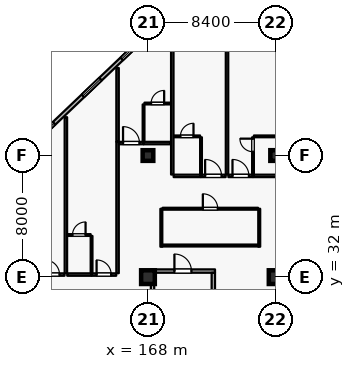
"""IFC4 building model, lengths in metres.
Left out: names, types, materials, properties, quantities, classifications, styles, units other than length and angle.
Written with IfcOpenShell. Run it as: python <this file> out.ifc"""

import sys

from ifc_helpers import new_model, si_unit, direction, frame, frame_2d, origin, origin_2d, place, context, subcontext, project, spatial, rectangle, extrude, element, fill, save


model = new_model("IFC4")
c1 = context("Model", 3, precision=1e-05, world=origin(), true_north=direction((0.0, 1.0)))
c2 = subcontext(c1, "Body", "Model", "MODEL_VIEW")
j1 = project(units=[si_unit("LENGTHUNIT", "METRE"), si_unit("PLANEANGLEUNIT", "RADIAN")], contexts=[c1])
p1 = place(None, origin())
s1 = spatial("IfcSite", under=j1, at=p1, CompositionType="ELEMENT")
p2 = place(p1, origin())
s2 = spatial("IfcBuilding", under=s1, at=p2, CompositionType="ELEMENT")
p3 = place(p2, frame((0.0, 0.0, 25.2)))
s3 = spatial("IfcBuildingStorey", under=s2, at=p3, CompositionType="ELEMENT", Elevation=25.2)
for number, where, z_axis, x_axis in (
    (1, (168.0, 32.0, 0.0), (0.0, 0.0, 1.0), (1.0, 0.0, 0.0)),
    (2, (176.4, 32.0, 0.0), (0.0, 0.0, 1.0), (1.0, 0.0, 0.0)),
):
    element("IfcColumn", number, at=place(p3, frame(where, z_axis=z_axis, x_axis=x_axis)), inside=s3, PredefinedType="COLUMN", context=c2, shape_type="SweptSolid", body=[
        extrude(rectangle(XDim=0.9, YDim=0.9, at=origin_2d()), origin(), (0.0, 0.0, 1.0), 3.6),
    ])
for number, where, z_axis, x_axis in (
    (3, (168.0, 40.0, 0.0), (0.0, 0.0, 1.0), (1.0, 0.0, 0.0)),
    (4, (176.4, 40.0, 0.0), (0.0, 0.0, 1.0), (1.0, 0.0, 0.0)),
):
    element("IfcColumn", number, at=place(p3, frame(where, z_axis=z_axis, x_axis=x_axis)), inside=s3, PredefinedType="COLUMN", context=c2, shape_type="SweptSolid", body=[
        extrude(rectangle(XDim=0.7, YDim=0.7, at=origin_2d()), origin(), (0.0, 0.0, 1.0), 3.6),
    ])
p4 = place(p3, frame((160.0, 40.381, 0.0), z_axis=(0.0, 0.0, 1.0), x_axis=(0.724156739794, 0.689635422677, 0.0)))
e5 = element("IfcWall", 5, at=p4, inside=s3, PredefinedType="SOLIDWALL", context=c2, shape_type="SweptSolid", body=[
    extrude(rectangle(XDim=10.495, YDim=0.24, at=frame_2d((5.248, 0.0))), origin(), (0.0, 0.0, 1.0), 2.93),
])
p5 = place(p4, frame((0.926, 0.0, 0.8)))
e6 = element("IfcOpeningElement", 6, at=p5, cuts=e5, PredefinedType="OPENING", context=c2, shape_type="SweptSolid", body=[
    extrude(rectangle(XDim=1.6, YDim=1.6, at=frame_2d((0.8, 0.8))), frame((0.0, 0.13, 0.0), z_axis=(0.0, -1.0, 0.0), x_axis=(1.0, 0.0, 0.0)), (0.0, 0.0, 1.0), 0.26),
])
p6 = place(p4, frame((5.138, 0.0, 0.8)))
e7 = element("IfcOpeningElement", 7, at=p6, cuts=e5, PredefinedType="OPENING", context=c2, shape_type="SweptSolid", body=[
    extrude(rectangle(XDim=1.6, YDim=1.6, at=frame_2d((0.8, 0.8))), frame((0.0, 0.13, 0.0), z_axis=(0.0, -1.0, 0.0), x_axis=(1.0, 0.0, 0.0)), (0.0, 0.0, 1.0), 0.26),
])
p7 = place(p4, frame((8.659, 0.0, 0.8)))
e8 = element("IfcOpeningElement", 8, at=p7, cuts=e5, PredefinedType="OPENING", context=c2, shape_type="SweptSolid", body=[
    extrude(rectangle(XDim=1.6, YDim=1.6, at=frame_2d((0.8, 0.8))), frame((0.0, 0.13, 0.0), z_axis=(0.0, -1.0, 0.0), x_axis=(1.0, 0.0, 0.0)), (0.0, 0.0, 1.0), 0.26),
])
p8 = place(p3, frame((168.3, 29.365, 0.0), z_axis=(0.0, 0.0, 1.0), x_axis=(0.0, 1.0, 0.0)))
e9 = element("IfcWall", 9, at=p8, inside=s3, PredefinedType="PARTITIONING", context=c2, shape_type="SweptSolid", body=[
    extrude(rectangle(XDim=2.92, YDim=0.22, at=frame_2d((1.46, 0.0))), origin(), (0.0, 0.0, 1.0), 3.335),
])
p9 = place(p3, frame((168.19, 32.4, 0.0), z_axis=(0.0, 0.0, 1.0), x_axis=(1.0, 0.0, 0.0)))
e10 = element("IfcWall", 10, at=p9, inside=s3, PredefinedType="PARTITIONING", context=c2, shape_type="SweptSolid", body=[
    extrude(rectangle(XDim=4.22, YDim=0.22, at=frame_2d((2.11, 0.0))), origin(), (0.0, 0.0, 1.0), 3.335),
])
p10 = place(p9, frame((1.55, 0.0, 0.0)))
e11 = element("IfcOpeningElement", 11, at=p10, cuts=e10, PredefinedType="OPENING", context=c2, shape_type="SweptSolid", body=[
    extrude(rectangle(XDim=1.12, YDim=2.2, at=frame_2d((0.56, 1.1))), frame((0.0, 0.12, 0.0), z_axis=(0.0, -1.0, 0.0), x_axis=(1.0, 0.0, 0.0)), (0.0, 0.0, 1.0), 0.24),
])
p11 = place(p3, frame((172.3, 29.365, 0.0), z_axis=(0.0, 0.0, 1.0), x_axis=(0.0, 1.0, 0.0)))
e12 = element("IfcWall", 12, at=p11, inside=s3, PredefinedType="PARTITIONING", context=c2, shape_type="SweptSolid", body=[
    extrude(rectangle(XDim=2.92, YDim=0.22, at=frame_2d((1.46, 0.0))), origin(), (0.0, 0.0, 1.0), 3.335),
])
p12 = place(p3, frame((160.89, 32.17, 0.0), z_axis=(0.0, 0.0, 1.0), x_axis=(1.0, 0.0, 0.0)))
e13 = element("IfcWall", 13, at=p12, inside=s3, PredefinedType="PARTITIONING", context=c2, shape_type="SweptSolid", body=[
    extrude(rectangle(XDim=1.62, YDim=0.16, at=frame_2d((0.81, 0.0))), origin(), (0.0, 0.0, 1.0), 3.335),
])
p13 = place(p12, frame((0.33, 0.0, 0.0)))
e14 = element("IfcOpeningElement", 14, at=p13, cuts=e13, PredefinedType="OPENING", context=c2, shape_type="SweptSolid", body=[
    extrude(rectangle(XDim=0.96, YDim=2.2, at=frame_2d((0.48, 1.1))), frame((0.0, 0.09, 0.0), z_axis=(0.0, -1.0, 0.0), x_axis=(1.0, 0.0, 0.0)), (0.0, 0.0, 1.0), 0.18),
])
p14 = place(p3, frame((162.69, 32.17, 0.0), z_axis=(0.0, 0.0, 1.0), x_axis=(1.0, 0.0, 0.0)))
e15 = element("IfcWall", 15, at=p14, inside=s3, PredefinedType="PARTITIONING", context=c2, shape_type="SweptSolid", body=[
    extrude(rectangle(XDim=1.59, YDim=0.16, at=frame_2d((0.795, 0.0))), origin(), (0.0, 0.0, 1.0), 3.335),
])
p15 = place(p3, frame((164.29, 32.17, 0.0), z_axis=(0.0, 0.0, 1.0), x_axis=(1.0, 0.0, 0.0)))
e16 = element("IfcWall", 16, at=p15, inside=s3, PredefinedType="PARTITIONING", context=c2, shape_type="SweptSolid", body=[
    extrude(rectangle(XDim=1.62, YDim=0.16, at=frame_2d((0.81, 0.0))), origin(), (0.0, 0.0, 1.0), 3.335),
])
p16 = place(p15, frame((0.33, 0.0, 0.0)))
e17 = element("IfcOpeningElement", 17, at=p16, cuts=e16, PredefinedType="OPENING", context=c2, shape_type="SweptSolid", body=[
    extrude(rectangle(XDim=0.96, YDim=2.2, at=frame_2d((0.48, 1.1))), frame((0.0, 0.09, 0.0), z_axis=(0.0, -1.0, 0.0), x_axis=(1.0, 0.0, 0.0)), (0.0, 0.0, 1.0), 0.18),
])
p17 = place(p3, frame((164.29, 32.26, 0.0), z_axis=(0.0, 0.0, 1.0), x_axis=(0.0, 1.0, 0.0)))
e18 = element("IfcWall", 18, at=p17, inside=s3, PredefinedType="PARTITIONING", context=c2, shape_type="SweptSolid", body=[
    extrude(rectangle(XDim=2.45, YDim=0.115, at=frame_2d((1.225, 0.0))), origin(), (0.0, 0.0, 1.0), 3.335),
])
p18 = place(p3, frame((162.7, 34.77, 0.0), z_axis=(0.0, 0.0, 1.0), x_axis=(1.0, 0.0, 0.0)))
e19 = element("IfcWall", 19, at=p18, inside=s3, PredefinedType="PARTITIONING", context=c2, shape_type="SweptSolid", body=[
    extrude(rectangle(XDim=1.53, YDim=0.115, at=frame_2d((0.765, 0.0))), origin(), (0.0, 0.0, 1.0), 3.335),
])
p19 = place(p18, frame((0.335, 0.0, 0.0)))
e20 = element("IfcOpeningElement", 20, at=p19, cuts=e19, PredefinedType="OPENING", context=c2, shape_type="SweptSolid", body=[
    extrude(rectangle(XDim=0.86, YDim=2.12, at=frame_2d((0.43, 1.06))), frame((0.0, 0.067, 0.0), z_axis=(0.0, -1.0, 0.0), x_axis=(1.0, 0.0, 0.0)), (0.0, 0.0, 1.0), 0.135),
])
p20 = place(p3, frame((162.6, 32.26, 0.0), z_axis=(0.0, 0.0, 1.0), x_axis=(0.0, 1.0, 0.0)))
e21 = element("IfcWall", 21, at=p20, inside=s3, PredefinedType="PARTITIONING", context=c2, shape_type="SweptSolid", body=[
    extrude(rectangle(XDim=10.26, YDim=0.16, at=frame_2d((5.13, 0.0))), origin(), (0.0, 0.0, 1.0), 3.335),
])
p21 = place(p3, frame((166.0, 32.26, 0.0), z_axis=(0.0, 0.0, 1.0), x_axis=(0.0, 1.0, 0.0)))
e22 = element("IfcWall", 22, at=p21, inside=s3, PredefinedType="PARTITIONING", context=c2, shape_type="SweptSolid", body=[
    extrude(rectangle(XDim=8.64, YDim=0.16, at=frame_2d((4.32, 0.0))), origin(), (0.0, 0.0, 1.0), 3.335),
])
p22 = place(p3, frame((166.09, 40.82, 0.0), z_axis=(0.0, 0.0, 1.0), x_axis=(1.0, 0.0, 0.0)))
e23 = element("IfcWall", 23, at=p22, inside=s3, PredefinedType="PARTITIONING", context=c2, shape_type="SweptSolid", body=[
    extrude(rectangle(XDim=1.62, YDim=0.16, at=frame_2d((0.81, 0.0))), origin(), (0.0, 0.0, 1.0), 3.335),
])
p23 = place(p22, frame((0.27, 0.0, 0.0)))
e24 = element("IfcOpeningElement", 24, at=p23, cuts=e23, PredefinedType="OPENING", context=c2, shape_type="SweptSolid", body=[
    extrude(rectangle(XDim=1.08, YDim=2.3, at=frame_2d((0.54, 1.15))), frame((0.0, 0.09, 0.0), z_axis=(0.0, -1.0, 0.0), x_axis=(1.0, 0.0, 0.0)), (0.0, 0.0, 1.0), 0.18),
])
p24 = place(p3, frame((167.72, 40.82, 0.0), z_axis=(0.0, 0.0, 1.0), x_axis=(1.0, 0.0, 0.0)))
e25 = element("IfcWall", 25, at=p24, inside=s3, PredefinedType="PARTITIONING", context=c2, shape_type="SweptSolid", body=[
    extrude(rectangle(XDim=1.79, YDim=0.16, at=frame_2d((0.895, 0.0))), origin(), (0.0, 0.0, 1.0), 3.335),
])
p25 = place(p3, frame((167.71, 40.91, 0.0), z_axis=(0.0, 0.0, 1.0), x_axis=(0.0, 1.0, 0.0)))
e26 = element("IfcWall", 26, at=p25, inside=s3, PredefinedType="PARTITIONING", context=c2, shape_type="SweptSolid", body=[
    extrude(rectangle(XDim=2.45, YDim=0.115, at=frame_2d((1.225, 0.0))), origin(), (0.0, 0.0, 1.0), 3.335),
])
p26 = place(p3, frame((167.77, 43.42, 0.0), z_axis=(0.0, 0.0, 1.0), x_axis=(1.0, 0.0, 0.0)))
e27 = element("IfcWall", 27, at=p26, inside=s3, PredefinedType="PARTITIONING", context=c2, shape_type="SweptSolid", body=[
    extrude(rectangle(XDim=1.73, YDim=0.115, at=frame_2d((0.865, 0.0))), origin(), (0.0, 0.0, 1.0), 3.335),
])
p27 = place(p26, frame((0.435, 0.0, 0.0)))
e28 = element("IfcOpeningElement", 28, at=p27, cuts=e27, PredefinedType="OPENING", context=c2, shape_type="SweptSolid", body=[
    extrude(rectangle(XDim=0.86, YDim=2.12, at=frame_2d((0.43, 1.06))), frame((0.0, 0.067, 0.0), z_axis=(0.0, -1.0, 0.0), x_axis=(1.0, 0.0, 0.0)), (0.0, 0.0, 1.0), 0.135),
])
p28 = place(p3, frame((166.0, 40.91, 0.0), z_axis=(0.0, 0.0, 1.0), x_axis=(0.0, 1.0, 0.0)))
e29 = element("IfcWall", 29, at=p28, inside=s3, PredefinedType="PARTITIONING", context=c2, shape_type="SweptSolid", body=[
    extrude(rectangle(XDim=4.85, YDim=0.16, at=frame_2d((2.425, 0.0))), origin(), (0.0, 0.0, 1.0), 3.335),
])
p29 = place(p3, frame((169.69, 38.66, 0.0), z_axis=(0.0, 0.0, 1.0), x_axis=(1.0, 0.0, 0.0)))
e30 = element("IfcWall", 30, at=p29, inside=s3, PredefinedType="PARTITIONING", context=c2, shape_type="SweptSolid", body=[
    extrude(rectangle(XDim=1.79, YDim=0.16, at=frame_2d((0.895, 0.0))), origin(), (0.0, 0.0, 1.0), 3.335),
])
p30 = place(p3, frame((171.49, 38.66, 0.0), z_axis=(0.0, 0.0, 1.0), x_axis=(1.0, 0.0, 0.0)))
e31 = element("IfcWall", 31, at=p30, inside=s3, PredefinedType="PARTITIONING", context=c2, shape_type="SweptSolid", body=[
    extrude(rectangle(XDim=1.62, YDim=0.16, at=frame_2d((0.81, 0.0))), origin(), (0.0, 0.0, 1.0), 3.335),
])
p31 = place(p30, frame((0.27, 0.0, 0.0)))
e32 = element("IfcOpeningElement", 32, at=p31, cuts=e31, PredefinedType="OPENING", context=c2, shape_type="SweptSolid", body=[
    extrude(rectangle(XDim=1.08, YDim=2.3, at=frame_2d((0.54, 1.15))), frame((0.0, 0.09, 0.0), z_axis=(0.0, -1.0, 0.0), x_axis=(1.0, 0.0, 0.0)), (0.0, 0.0, 1.0), 0.18),
])
p32 = place(p3, frame((171.49, 38.75, 0.0), z_axis=(0.0, 0.0, 1.0), x_axis=(0.0, 1.0, 0.0)))
e33 = element("IfcWall", 33, at=p32, inside=s3, PredefinedType="PARTITIONING", context=c2, shape_type="SweptSolid", body=[
    extrude(rectangle(XDim=2.45, YDim=0.115, at=frame_2d((1.225, 0.0))), origin(), (0.0, 0.0, 1.0), 3.335),
])
p33 = place(p3, frame((169.7, 41.26, 0.0), z_axis=(0.0, 0.0, 1.0), x_axis=(1.0, 0.0, 0.0)))
e34 = element("IfcWall", 34, at=p33, inside=s3, PredefinedType="PARTITIONING", context=c2, shape_type="SweptSolid", body=[
    extrude(rectangle(XDim=1.73, YDim=0.115, at=frame_2d((0.865, 0.0))), origin(), (0.0, 0.0, 1.0), 3.335),
])
p34 = place(p33, frame((0.435, 0.0, 0.0)))
e35 = element("IfcOpeningElement", 35, at=p34, cuts=e34, PredefinedType="OPENING", context=c2, shape_type="SweptSolid", body=[
    extrude(rectangle(XDim=0.86, YDim=2.12, at=frame_2d((0.43, 1.06))), frame((0.0, 0.067, 0.0), z_axis=(0.0, -1.0, 0.0), x_axis=(1.0, 0.0, 0.0)), (0.0, 0.0, 1.0), 0.135),
])
p35 = place(p3, frame((169.6, 38.75, 0.0), z_axis=(0.0, 0.0, 1.0), x_axis=(0.0, 1.0, 0.0)))
e36 = element("IfcWall", 36, at=p35, inside=s3, PredefinedType="PARTITIONING", context=c2, shape_type="SweptSolid", body=[
    extrude(rectangle(XDim=8.91, YDim=0.16, at=frame_2d((4.455, 0.0))), origin(), (0.0, 0.0, 1.0), 3.335),
])
p36 = place(p3, frame((173.29, 38.66, 0.0), z_axis=(0.0, 0.0, 1.0), x_axis=(1.0, 0.0, 0.0)))
e37 = element("IfcWall", 37, at=p36, inside=s3, PredefinedType="PARTITIONING", context=c2, shape_type="SweptSolid", body=[
    extrude(rectangle(XDim=1.62, YDim=0.16, at=frame_2d((0.81, 0.0))), origin(), (0.0, 0.0, 1.0), 3.335),
])
p37 = place(p36, frame((0.27, 0.0, 0.0)))
e38 = element("IfcOpeningElement", 38, at=p37, cuts=e37, PredefinedType="OPENING", context=c2, shape_type="SweptSolid", body=[
    extrude(rectangle(XDim=1.08, YDim=2.3, at=frame_2d((0.54, 1.15))), frame((0.0, 0.09, 0.0), z_axis=(0.0, -1.0, 0.0), x_axis=(1.0, 0.0, 0.0)), (0.0, 0.0, 1.0), 0.18),
])
p38 = place(p3, frame((174.92, 38.66, 0.0), z_axis=(0.0, 0.0, 1.0), x_axis=(1.0, 0.0, 0.0)))
e39 = element("IfcWall", 39, at=p38, inside=s3, PredefinedType="PARTITIONING", context=c2, shape_type="SweptSolid", body=[
    extrude(rectangle(XDim=1.79, YDim=0.16, at=frame_2d((0.895, 0.0))), origin(), (0.0, 0.0, 1.0), 3.335),
])
p39 = place(p3, frame((174.91, 38.75, 0.0), z_axis=(0.0, 0.0, 1.0), x_axis=(0.0, 1.0, 0.0)))
e40 = element("IfcWall", 40, at=p39, inside=s3, PredefinedType="PARTITIONING", context=c2, shape_type="SweptSolid", body=[
    extrude(rectangle(XDim=2.45, YDim=0.115, at=frame_2d((1.225, 0.0))), origin(), (0.0, 0.0, 1.0), 3.335),
])
p40 = place(p39, frame((1.5, 0.0, 0.0)))
e41 = element("IfcOpeningElement", 41, at=p40, cuts=e40, PredefinedType="OPENING", context=c2, shape_type="SweptSolid", body=[
    extrude(rectangle(XDim=0.86, YDim=2.12, at=frame_2d((0.43, 1.06))), frame((0.0, 0.067, 0.0), z_axis=(0.0, -1.0, 0.0), x_axis=(1.0, 0.0, 0.0)), (0.0, 0.0, 1.0), 0.135),
])
p41 = place(p3, frame((174.97, 41.26, 0.0), z_axis=(0.0, 0.0, 1.0), x_axis=(1.0, 0.0, 0.0)))
e42 = element("IfcWall", 42, at=p41, inside=s3, PredefinedType="PARTITIONING", context=c2, shape_type="SweptSolid", body=[
    extrude(rectangle(XDim=1.73, YDim=0.115, at=frame_2d((0.865, 0.0))), origin(), (0.0, 0.0, 1.0), 3.335),
])
p42 = place(p3, frame((173.2, 38.75, 0.0), z_axis=(0.0, 0.0, 1.0), x_axis=(0.0, 1.0, 0.0)))
e43 = element("IfcWall", 43, at=p42, inside=s3, PredefinedType="PARTITIONING", context=c2, shape_type="SweptSolid", body=[
    extrude(rectangle(XDim=8.91, YDim=0.16, at=frame_2d((4.455, 0.0))), origin(), (0.0, 0.0, 1.0), 3.335),
])
p43 = place(p3, frame((168.96, 36.5, 0.0), z_axis=(0.0, 0.0, 1.0), x_axis=(1.0, 0.0, 0.0)))
e44 = element("IfcWall", 44, at=p43, inside=s3, PredefinedType="PARTITIONING", context=c2, shape_type="SweptSolid", body=[
    extrude(rectangle(XDim=6.28, YDim=0.125, at=frame_2d((3.14, 0.0))), origin(), (0.0, 0.0, 1.0), 3.335),
])
p44 = place(p43, frame((2.65, 0.0, 0.0)))
e45 = element("IfcOpeningElement", 45, at=p44, cuts=e44, PredefinedType="OPENING", context=c2, shape_type="SweptSolid", body=[
    extrude(rectangle(XDim=0.98, YDim=2.15, at=frame_2d((0.49, 1.075))), frame((0.0, 0.073, 0.0), z_axis=(0.0, -1.0, 0.0), x_axis=(1.0, 0.0, 0.0)), (0.0, 0.0, 1.0), 0.145),
])
for number, where, z_axis, x_axis in (
    (46, (168.88, 34.0, 0.0), (0.0, 0.0, 1.0), (0.0, 1.0, 0.0)),
    (47, (175.32, 34.0, 0.0), (0.0, 0.0, 1.0), (0.0, 1.0, 0.0)),
):
    element("IfcWall", number, at=place(p3, frame(where, z_axis=z_axis, x_axis=x_axis)), inside=s3, PredefinedType="PARTITIONING", context=c2, shape_type="SweptSolid", body=[
        extrude(rectangle(XDim=2.496, YDim=0.125, at=frame_2d((1.248, 0.0))), origin(), (0.0, 0.0, 1.0), 3.335),
    ])
p45 = place(p3, frame((168.943, 34.08, 0.0), z_axis=(0.0, 0.0, 1.0), x_axis=(1.0, 0.0, 0.0)))
e48 = element("IfcWall", 48, at=p45, inside=s3, PredefinedType="PARTITIONING", context=c2, shape_type="SweptSolid", body=[
    extrude(rectangle(XDim=6.314, YDim=0.125, at=frame_2d((3.157, 0.0))), origin(), (0.0, 0.0, 1.0), 3.335),
])
p46 = place(p5, origin())
e49 = element("IfcWindow", 49, at=p46, inside=s3, PartitioningType="SINGLE_PANEL", PredefinedType="WINDOW", context=c2, shape_type="SweptSolid", body=[
    extrude(rectangle(XDim=1.6, YDim=1.6, at=frame_2d((0.8, 0.8))), frame((0.0, 0.03, 0.0), z_axis=(0.0, -1.0, 0.0), x_axis=(1.0, 0.0, 0.0)), (0.0, 0.0, 1.0), 0.06),
])
fill(e6, e49)
p47 = place(p6, origin())
e50 = element("IfcWindow", 50, at=p47, inside=s3, PartitioningType="SINGLE_PANEL", PredefinedType="WINDOW", context=c2, shape_type="SweptSolid", body=[
    extrude(rectangle(XDim=1.6, YDim=1.6, at=frame_2d((0.8, 0.8))), frame((0.0, 0.03, 0.0), z_axis=(0.0, -1.0, 0.0), x_axis=(1.0, 0.0, 0.0)), (0.0, 0.0, 1.0), 0.06),
])
fill(e7, e50)
p48 = place(p7, origin())
e51 = element("IfcWindow", 51, at=p48, inside=s3, PartitioningType="SINGLE_PANEL", PredefinedType="WINDOW", context=c2, shape_type="SweptSolid", body=[
    extrude(rectangle(XDim=1.6, YDim=1.6, at=frame_2d((0.8, 0.8))), frame((0.0, 0.03, 0.0), z_axis=(0.0, -1.0, 0.0), x_axis=(1.0, 0.0, 0.0)), (0.0, 0.0, 1.0), 0.06),
])
fill(e8, e51)
p49 = place(p10, origin())
e52 = element("IfcDoor", 52, at=p49, inside=s3, OperationType="SINGLE_SWING_LEFT", PredefinedType="DOOR", context=c2, shape_type="SweptSolid", body=[
    extrude(rectangle(XDim=1.12, YDim=2.2, at=frame_2d((0.56, 1.1))), frame((0.0, 0.025, 0.0), z_axis=(0.0, -1.0, 0.0), x_axis=(1.0, 0.0, 0.0)), (0.0, 0.0, 1.0), 0.05),
])
fill(e11, e52)
p50 = place(p13, origin())
e53 = element("IfcDoor", 53, at=p50, inside=s3, OperationType="SINGLE_SWING_LEFT", PredefinedType="DOOR", context=c2, shape_type="SweptSolid", body=[
    extrude(rectangle(XDim=0.96, YDim=2.2, at=frame_2d((0.48, 1.1))), frame((0.0, 0.025, 0.0), z_axis=(0.0, -1.0, 0.0), x_axis=(1.0, 0.0, 0.0)), (0.0, 0.0, 1.0), 0.05),
])
fill(e14, e53)
p51 = place(p16, origin())
e54 = element("IfcDoor", 54, at=p51, inside=s3, OperationType="SINGLE_SWING_LEFT", PredefinedType="DOOR", context=c2, shape_type="SweptSolid", body=[
    extrude(rectangle(XDim=0.96, YDim=2.2, at=frame_2d((0.48, 1.1))), frame((0.0, 0.025, 0.0), z_axis=(0.0, -1.0, 0.0), x_axis=(1.0, 0.0, 0.0)), (0.0, 0.0, 1.0), 0.05),
])
fill(e17, e54)
p52 = place(p19, origin())
e55 = element("IfcDoor", 55, at=p52, inside=s3, OperationType="SINGLE_SWING_RIGHT", PredefinedType="DOOR", context=c2, shape_type="SweptSolid", body=[
    extrude(rectangle(XDim=0.86, YDim=2.12, at=frame_2d((0.43, 1.06))), frame((0.0, 0.025, 0.0), z_axis=(0.0, -1.0, 0.0), x_axis=(1.0, 0.0, 0.0)), (0.0, 0.0, 1.0), 0.05),
])
fill(e20, e55)
p53 = place(p23, origin())
e56 = element("IfcDoor", 56, at=p53, inside=s3, OperationType="SINGLE_SWING_LEFT", PredefinedType="DOOR", context=c2, shape_type="SweptSolid", body=[
    extrude(rectangle(XDim=1.08, YDim=2.3, at=frame_2d((0.54, 1.15))), frame((0.0, 0.025, 0.0), z_axis=(0.0, -1.0, 0.0), x_axis=(1.0, 0.0, 0.0)), (0.0, 0.0, 1.0), 0.05),
])
fill(e24, e56)
p54 = place(p27, origin())
e57 = element("IfcDoor", 57, at=p54, inside=s3, OperationType="SINGLE_SWING_RIGHT", PredefinedType="DOOR", context=c2, shape_type="SweptSolid", body=[
    extrude(rectangle(XDim=0.86, YDim=2.12, at=frame_2d((0.43, 1.06))), frame((0.0, 0.025, 0.0), z_axis=(0.0, -1.0, 0.0), x_axis=(1.0, 0.0, 0.0)), (0.0, 0.0, 1.0), 0.05),
])
fill(e28, e57)
p55 = place(p31, origin())
e58 = element("IfcDoor", 58, at=p55, inside=s3, OperationType="SINGLE_SWING_LEFT", PredefinedType="DOOR", context=c2, shape_type="SweptSolid", body=[
    extrude(rectangle(XDim=1.08, YDim=2.3, at=frame_2d((0.54, 1.15))), frame((0.0, 0.025, 0.0), z_axis=(0.0, -1.0, 0.0), x_axis=(1.0, 0.0, 0.0)), (0.0, 0.0, 1.0), 0.05),
])
fill(e32, e58)
p56 = place(p34, origin())
e59 = element("IfcDoor", 59, at=p56, inside=s3, OperationType="SINGLE_SWING_RIGHT", PredefinedType="DOOR", context=c2, shape_type="SweptSolid", body=[
    extrude(rectangle(XDim=0.86, YDim=2.12, at=frame_2d((0.43, 1.06))), frame((0.0, 0.025, 0.0), z_axis=(0.0, -1.0, 0.0), x_axis=(1.0, 0.0, 0.0)), (0.0, 0.0, 1.0), 0.05),
])
fill(e35, e59)
p57 = place(p37, origin())
e60 = element("IfcDoor", 60, at=p57, inside=s3, OperationType="SINGLE_SWING_LEFT", PredefinedType="DOOR", context=c2, shape_type="SweptSolid", body=[
    extrude(rectangle(XDim=1.08, YDim=2.3, at=frame_2d((0.54, 1.15))), frame((0.0, 0.025, 0.0), z_axis=(0.0, -1.0, 0.0), x_axis=(1.0, 0.0, 0.0)), (0.0, 0.0, 1.0), 0.05),
])
fill(e38, e60)
p58 = place(p40, origin())
e61 = element("IfcDoor", 61, at=p58, inside=s3, OperationType="SINGLE_SWING_RIGHT", PredefinedType="DOOR", context=c2, shape_type="SweptSolid", body=[
    extrude(rectangle(XDim=0.86, YDim=2.12, at=frame_2d((0.43, 1.06))), frame((0.0, 0.025, 0.0), z_axis=(0.0, -1.0, 0.0), x_axis=(1.0, 0.0, 0.0)), (0.0, 0.0, 1.0), 0.05),
])
fill(e41, e61)
p59 = place(p44, origin())
e62 = element("IfcDoor", 62, at=p59, inside=s3, OperationType="SINGLE_SWING_LEFT", PredefinedType="DOOR", context=c2, shape_type="SweptSolid", body=[
    extrude(rectangle(XDim=0.98, YDim=2.15, at=frame_2d((0.49, 1.075))), frame((0.0, 0.025, 0.0), z_axis=(0.0, -1.0, 0.0), x_axis=(1.0, 0.0, 0.0)), (0.0, 0.0, 1.0), 0.05),
])
fill(e45, e62)
save(model, sys.argv[1])
